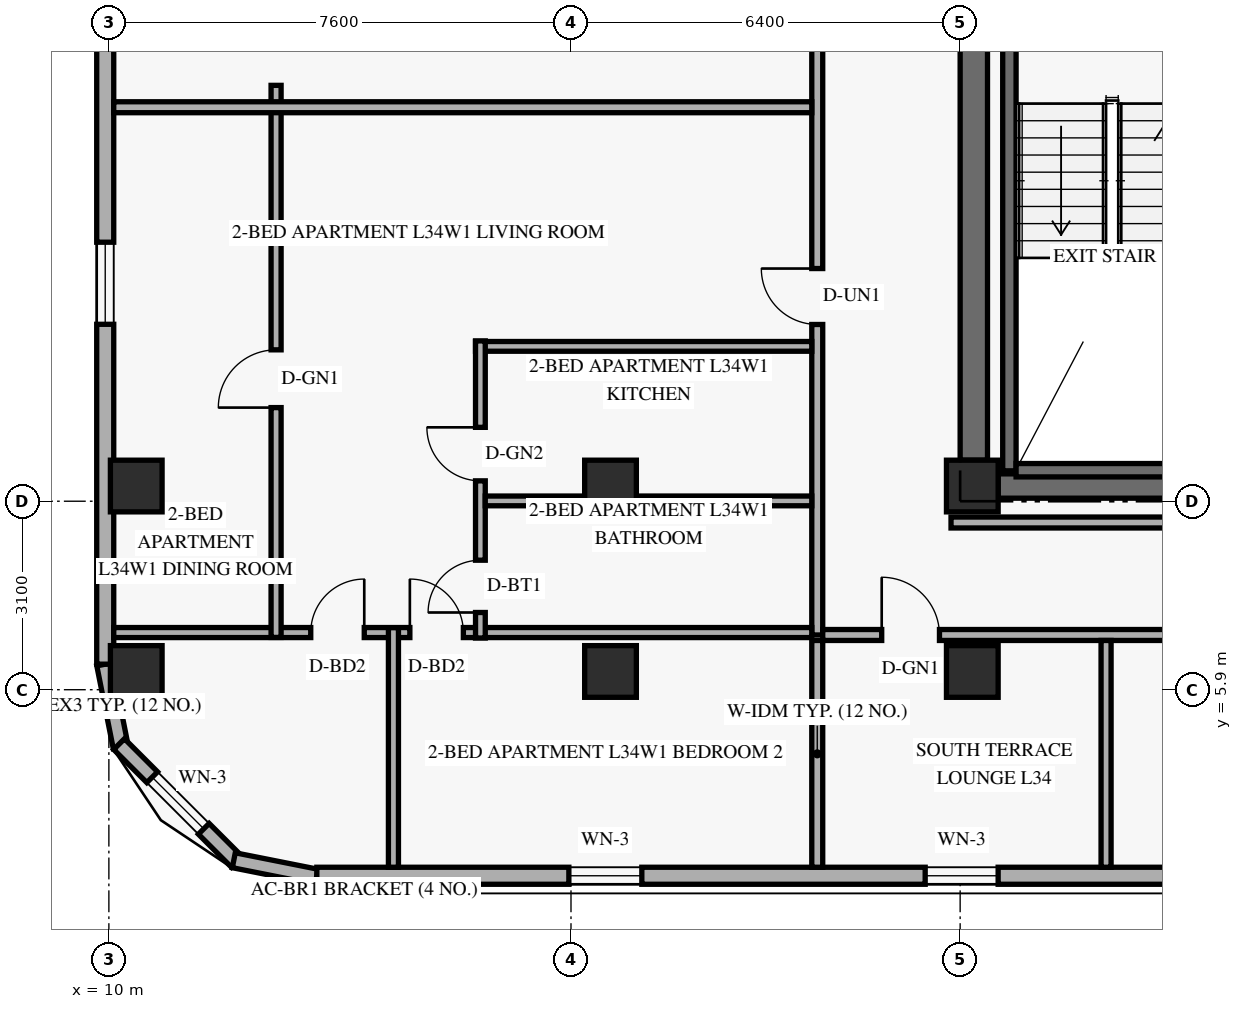
"""IFC4 building model, lengths in metres.
Left out: names, types, materials, properties, quantities, classifications, styles, units other than length and angle.
Written with IfcOpenShell. Run it as: python <this file> out.ifc"""

import sys

from ifc_helpers import new_model, si_unit, direction, frame, frame_2d, origin, origin_2d, place, context, subcontext, project, spatial, rectangle, extrude, element, fill, save


model = new_model("IFC4")
c1 = context("Model", 3, precision=1e-05, world=origin(), true_north=direction((0.0, 1.0)))
c2 = subcontext(c1, "Body", "Model", "MODEL_VIEW")
j1 = project(units=[si_unit("LENGTHUNIT", "METRE"), si_unit("PLANEANGLEUNIT", "RADIAN")], contexts=[c1])
p1 = place(None, origin())
s1 = spatial("IfcSite", under=j1, at=p1, CompositionType="ELEMENT")
p2 = place(p1, origin())
s2 = spatial("IfcBuilding", under=s1, at=p2, CompositionType="ELEMENT")
p3 = place(p2, frame((0.0, 0.0, 132.0)))
s3 = spatial("IfcBuildingStorey", under=s2, at=p3, CompositionType="ELEMENT", Elevation=132.0)
p4 = place(p3, frame((24.225, 9.675, 0.0), z_axis=(0.0, 0.0, 1.0), x_axis=(0.0, 1.0, 0.0)))
e1 = element("IfcWall", 1, at=p4, inside=s3, PredefinedType="SHEAR", context=c2, shape_type="SweptSolid", body=[
    extrude(rectangle(XDim=7.45, YDim=0.45, at=frame_2d((3.725, 0.0))), origin(), (0.0, 0.0, 1.0), 2.689),
])
p5 = place(p3, frame((24.625, 9.25, 0.0), z_axis=(0.0, 0.0, 1.0), x_axis=(1.0, 0.0, 0.0)))
e2 = element("IfcWall", 2, at=p5, inside=s3, PredefinedType="SHEAR", context=c2, shape_type="SweptSolid", body=[
    extrude(rectangle(XDim=10.15, YDim=0.4, at=frame_2d((5.075, 0.0))), origin(), (0.0, 0.0, 1.0), 3.3),
])
p6 = place(p5, frame((5.2, 0.0, 0.0)))
e3 = element("IfcOpeningElement", 3, at=p6, cuts=e2, PredefinedType="OPENING", context=c2, shape_type="SweptSolid", body=[
    extrude(rectangle(XDim=1.05, YDim=2.15, at=frame_2d((0.525, 1.075))), frame((0.0, 0.21, 0.0), z_axis=(0.0, -1.0, 0.0), x_axis=(1.0, 0.0, 0.0)), (0.0, 0.0, 1.0), 0.42),
])
p7 = place(p3, frame((24.81, 9.5, 0.0), z_axis=(0.0, 0.0, 1.0), x_axis=(0.0, 1.0, 0.0)))
e4 = element("IfcWall", 4, at=p7, inside=s3, PredefinedType="SHEAR", context=c2, shape_type="SweptSolid", body=[
    extrude(rectangle(XDim=7.76, YDim=0.22, at=frame_2d((3.88, 0.0))), origin(), (0.0, 0.0, 1.0), 3.3),
])
p8 = place(p3, frame((24.92, 9.51, 0.0), z_axis=(0.0, 0.0, 1.0), x_axis=(1.0, 0.0, 0.0)))
e5 = element("IfcWall", 5, at=p8, inside=s3, PredefinedType="SHEAR", context=c2, shape_type="SweptSolid", body=[
    extrude(rectangle(XDim=3.16, YDim=0.22, at=frame_2d((1.58, 0.0))), origin(), (0.0, 0.0, 1.0), 3.3),
])
for number, where, z_axis, x_axis in (
    (6, (10.45, 6.2, 0.0), (0.0, 0.0, 1.0), (1.0, 0.0, 0.0)),
    (7, (10.45, 9.25, 0.0), (0.0, 0.0, 1.0), (1.0, 0.0, 0.0)),
    (8, (18.25, 6.2, 0.0), (0.0, 0.0, 1.0), (1.0, 0.0, 0.0)),
    (9, (18.25, 9.25, 0.0), (0.0, 0.0, 1.0), (1.0, 0.0, 0.0)),
    (10, (24.2, 6.2, 0.0), (0.0, 0.0, 1.0), (1.0, 0.0, 0.0)),
    (11, (24.2, 9.25, 0.0), (0.0, 0.0, 1.0), (1.0, 0.0, 0.0)),
):
    element("IfcColumn", number, at=place(p3, frame(where, z_axis=z_axis, x_axis=x_axis)), inside=s3, PredefinedType="COLUMN", context=c2, shape_type="SweptSolid", body=[
        extrude(rectangle(XDim=0.85, YDim=0.85, at=origin_2d()), origin(), (0.0, 0.0, 1.0), 3.6),
    ])
p9 = place(p3, frame((9.924, 6.316, 0.0), z_axis=(0.0, 0.0, 1.0), x_axis=(0.195000137217, -0.980803214965, 0.0)))
e12 = element("IfcWall", 12, at=p9, inside=s3, PredefinedType="SOLIDWALL", context=c2, shape_type="SweptSolid", body=[
    extrude(rectangle(XDim=1.388, YDim=0.25, at=frame_2d((0.694, 0.0))), origin(), (0.0, 0.0, 1.0), 3.3),
])
p10 = place(p3, frame((10.168, 5.005, 0.0), z_axis=(0.0, 0.0, 1.0), x_axis=(0.707151344399, -0.707062215165, 0.0)))
e13 = element("IfcWall", 13, at=p10, inside=s3, PredefinedType="SOLIDWALL", context=c2, shape_type="SweptSolid", body=[
    extrude(rectangle(XDim=2.739, YDim=0.25, at=frame_2d((1.37, 0.0))), origin(), (0.0, 0.0, 1.0), 3.3),
])
p11 = place(p10, frame((0.77, 0.0, 0.85)))
e14 = element("IfcOpeningElement", 14, at=p11, cuts=e13, PredefinedType="OPENING", context=c2, shape_type="SweptSolid", body=[
    extrude(rectangle(XDim=1.2, YDim=1.5, at=frame_2d((0.6, 0.75))), frame((0.0, 0.135, 0.0), z_axis=(0.0, -1.0, 0.0), x_axis=(1.0, 0.0, 0.0)), (0.0, 0.0, 1.0), 0.27),
])
p12 = place(p3, frame((12.054, 3.095, 0.0), z_axis=(0.0, 0.0, 1.0), x_axis=(0.980809899341, -0.19496651342, 0.0)))
e15 = element("IfcWall", 15, at=p12, inside=s3, PredefinedType="SOLIDWALL", context=c2, shape_type="SweptSolid", body=[
    extrude(rectangle(XDim=1.389, YDim=0.25, at=frame_2d((0.694, 0.0))), origin(), (0.0, 0.0, 1.0), 3.3),
])
p13 = place(p3, frame((13.42, 2.84, 0.0), z_axis=(0.0, 0.0, 1.0), x_axis=(1.0, 0.0, 0.0)))
e16 = element("IfcWall", 16, at=p13, inside=s3, PredefinedType="SOLIDWALL", context=c2, shape_type="SweptSolid", body=[
    extrude(rectangle(XDim=36.56, YDim=0.28, at=frame_2d((18.28, 0.0))), origin(), (0.0, 0.0, 1.0), 3.3),
])
p14 = place(p13, frame((4.145, 0.0, 0.85)))
e17 = element("IfcOpeningElement", 17, at=p14, cuts=e16, PredefinedType="OPENING", context=c2, shape_type="SweptSolid", body=[
    extrude(rectangle(XDim=1.2, YDim=1.5, at=frame_2d((0.6, 0.75))), frame((0.0, 0.15, 0.0), z_axis=(0.0, -1.0, 0.0), x_axis=(1.0, 0.0, 0.0)), (0.0, 0.0, 1.0), 0.3),
])
p15 = place(p13, frame((10.005, 0.0, 0.85)))
e18 = element("IfcOpeningElement", 18, at=p15, cuts=e16, PredefinedType="OPENING", context=c2, shape_type="SweptSolid", body=[
    extrude(rectangle(XDim=1.2, YDim=1.5, at=frame_2d((0.6, 0.75))), frame((0.0, 0.15, 0.0), z_axis=(0.0, -1.0, 0.0), x_axis=(1.0, 0.0, 0.0)), (0.0, 0.0, 1.0), 0.3),
])
p16 = place(p13, frame((16.89, 0.0, 0.85)))
e19 = element("IfcOpeningElement", 19, at=p16, cuts=e16, PredefinedType="OPENING", context=c2, shape_type="SweptSolid", body=[
    extrude(rectangle(XDim=1.2, YDim=1.5, at=frame_2d((0.6, 0.75))), frame((0.0, 0.15, 0.0), z_axis=(0.0, -1.0, 0.0), x_axis=(1.0, 0.0, 0.0)), (0.0, 0.0, 1.0), 0.3),
])
p17 = place(p13, frame((22.465, 0.0, 0.85)))
e20 = element("IfcOpeningElement", 20, at=p17, cuts=e16, PredefinedType="OPENING", context=c2, shape_type="SweptSolid", body=[
    extrude(rectangle(XDim=1.2, YDim=1.5, at=frame_2d((0.6, 0.75))), frame((0.0, 0.15, 0.0), z_axis=(0.0, -1.0, 0.0), x_axis=(1.0, 0.0, 0.0)), (0.0, 0.0, 1.0), 0.3),
])
p18 = place(p13, frame((26.625, 0.0, 0.85)))
e21 = element("IfcOpeningElement", 21, at=p18, cuts=e16, PredefinedType="OPENING", context=c2, shape_type="SweptSolid", body=[
    extrude(rectangle(XDim=1.2, YDim=1.5, at=frame_2d((0.6, 0.75))), frame((0.0, 0.15, 0.0), z_axis=(0.0, -1.0, 0.0), x_axis=(1.0, 0.0, 0.0)), (0.0, 0.0, 1.0), 0.3),
])
p19 = place(p13, frame((31.45, 0.0, 0.85)))
e22 = element("IfcOpeningElement", 22, at=p19, cuts=e16, PredefinedType="OPENING", context=c2, shape_type="SweptSolid", body=[
    extrude(rectangle(XDim=1.2, YDim=1.5, at=frame_2d((0.6, 0.75))), frame((0.0, 0.15, 0.0), z_axis=(0.0, -1.0, 0.0), x_axis=(1.0, 0.0, 0.0)), (0.0, 0.0, 1.0), 0.3),
])
p20 = place(p13, frame((34.57, 0.0, 0.85)))
e23 = element("IfcOpeningElement", 23, at=p20, cuts=e16, PredefinedType="OPENING", context=c2, shape_type="SweptSolid", body=[
    extrude(rectangle(XDim=1.2, YDim=1.5, at=frame_2d((0.6, 0.75))), frame((0.0, 0.15, 0.0), z_axis=(0.0, -1.0, 0.0), x_axis=(1.0, 0.0, 0.0)), (0.0, 0.0, 1.0), 0.3),
])
p21 = place(p3, frame((9.94, 41.68, 0.0), z_axis=(0.0, 0.0, 1.0), x_axis=(0.0, -1.0, 0.0)))
e24 = element("IfcWall", 24, at=p21, inside=s3, PredefinedType="SOLIDWALL", context=c2, shape_type="SweptSolid", body=[
    extrude(rectangle(XDim=35.36, YDim=0.28, at=frame_2d((17.68, 0.0))), origin(), (0.0, 0.0, 1.0), 3.3),
])
p22 = place(p21, frame((28.42, 0.0, 0.85)))
e25 = element("IfcOpeningElement", 25, at=p22, cuts=e24, PredefinedType="OPENING", context=c2, shape_type="SweptSolid", body=[
    extrude(rectangle(XDim=1.35, YDim=1.55, at=frame_2d((0.675, 0.775))), frame((0.0, 0.15, 0.0), z_axis=(0.0, -1.0, 0.0), x_axis=(1.0, 0.0, 0.0)), (0.0, 0.0, 1.0), 0.3),
])
p23 = place(p21, frame((22.037, 0.0, 0.85)))
e26 = element("IfcOpeningElement", 26, at=p23, cuts=e24, PredefinedType="OPENING", context=c2, shape_type="SweptSolid", body=[
    extrude(rectangle(XDim=1.35, YDim=1.55, at=frame_2d((0.675, 0.775))), frame((0.0, 0.15, 0.0), z_axis=(0.0, -1.0, 0.0), x_axis=(1.0, 0.0, 0.0)), (0.0, 0.0, 1.0), 0.3),
])
p24 = place(p21, frame((17.619, 0.0, 0.85)))
e27 = element("IfcOpeningElement", 27, at=p24, cuts=e24, PredefinedType="OPENING", context=c2, shape_type="SweptSolid", body=[
    extrude(rectangle(XDim=1.35, YDim=1.55, at=frame_2d((0.675, 0.775))), frame((0.0, 0.15, 0.0), z_axis=(0.0, -1.0, 0.0), x_axis=(1.0, 0.0, 0.0)), (0.0, 0.0, 1.0), 0.3),
])
p25 = place(p21, frame((12.712, 0.0, 0.85)))
e28 = element("IfcOpeningElement", 28, at=p25, cuts=e24, PredefinedType="OPENING", context=c2, shape_type="SweptSolid", body=[
    extrude(rectangle(XDim=1.35, YDim=1.55, at=frame_2d((0.675, 0.775))), frame((0.0, 0.15, 0.0), z_axis=(0.0, -1.0, 0.0), x_axis=(1.0, 0.0, 0.0)), (0.0, 0.0, 1.0), 0.3),
])
p26 = place(p21, frame((8.848, 0.0, 0.85)))
e29 = element("IfcOpeningElement", 29, at=p26, cuts=e24, PredefinedType="OPENING", context=c2, shape_type="SweptSolid", body=[
    extrude(rectangle(XDim=1.35, YDim=1.55, at=frame_2d((0.675, 0.775))), frame((0.0, 0.15, 0.0), z_axis=(0.0, -1.0, 0.0), x_axis=(1.0, 0.0, 0.0)), (0.0, 0.0, 1.0), 0.3),
])
p27 = place(p21, frame((5.101, 0.0, 0.85)))
e30 = element("IfcOpeningElement", 30, at=p27, cuts=e24, PredefinedType="OPENING", context=c2, shape_type="SweptSolid", body=[
    extrude(rectangle(XDim=1.35, YDim=1.55, at=frame_2d((0.675, 0.775))), frame((0.0, 0.15, 0.0), z_axis=(0.0, -1.0, 0.0), x_axis=(1.0, 0.0, 0.0)), (0.0, 0.0, 1.0), 0.3),
])
p28 = place(p3, frame((21.65, 6.8, 0.0), z_axis=(0.0, 0.0, 1.0), x_axis=(0.0, 1.0, 0.0)))
e31 = element("IfcWall", 31, at=p28, inside=s3, PredefinedType="STANDARD", context=c2, shape_type="SweptSolid", body=[
    extrude(rectangle(XDim=34.4, YDim=0.18, at=frame_2d((17.2, 0.0))), origin(), (0.0, 0.0, 1.0), 2.671),
])
p29 = place(p28, frame((5.107, 0.0, 0.0)))
e32 = element("IfcOpeningElement", 32, at=p29, cuts=e31, PredefinedType="OPENING", context=c2, shape_type="SweptSolid", body=[
    extrude(rectangle(XDim=0.92, YDim=2.15, at=frame_2d((0.46, 1.075))), frame((0.0, 0.1, 0.0), z_axis=(0.0, -1.0, 0.0), x_axis=(1.0, 0.0, 0.0)), (0.0, 0.0, 1.0), 0.2),
])
p30 = place(p28, frame((13.99, 0.0, 0.0)))
e33 = element("IfcOpeningElement", 33, at=p30, cuts=e31, PredefinedType="OPENING", context=c2, shape_type="SweptSolid", body=[
    extrude(rectangle(XDim=0.92, YDim=2.15, at=frame_2d((0.46, 1.075))), frame((0.0, 0.1, 0.0), z_axis=(0.0, -1.0, 0.0), x_axis=(1.0, 0.0, 0.0)), (0.0, 0.0, 1.0), 0.2),
])
p31 = place(p28, frame((28.646, 0.0, 0.0)))
e34 = element("IfcOpeningElement", 34, at=p31, cuts=e31, PredefinedType="OPENING", context=c2, shape_type="SweptSolid", body=[
    extrude(rectangle(XDim=0.92, YDim=2.15, at=frame_2d((0.46, 1.075))), frame((0.0, 0.1, 0.0), z_axis=(0.0, -1.0, 0.0), x_axis=(1.0, 0.0, 0.0)), (0.0, 0.0, 1.0), 0.2),
])
p32 = place(p3, frame((21.74, 6.8, 0.0), z_axis=(0.0, 0.0, 1.0), x_axis=(1.0, 0.0, 0.0)))
e35 = element("IfcWall", 35, at=p32, inside=s3, PredefinedType="STANDARD", context=c2, shape_type="SweptSolid", body=[
    extrude(rectangle(XDim=13.68, YDim=0.18, at=frame_2d((6.84, 0.0))), origin(), (0.0, 0.0, 1.0), 2.671),
])
p33 = place(p32, frame((0.97, 0.0, 0.0)))
e36 = element("IfcOpeningElement", 36, at=p33, cuts=e35, PredefinedType="OPENING", context=c2, shape_type="SweptSolid", body=[
    extrude(rectangle(XDim=0.95, YDim=2.15, at=frame_2d((0.475, 1.075))), frame((0.0, 0.1, 0.0), z_axis=(0.0, -1.0, 0.0), x_axis=(1.0, 0.0, 0.0)), (0.0, 0.0, 1.0), 0.2),
])
p34 = place(p32, frame((9.11, 0.0, 0.0)))
e37 = element("IfcOpeningElement", 37, at=p34, cuts=e35, PredefinedType="OPENING", context=c2, shape_type="SweptSolid", body=[
    extrude(rectangle(XDim=0.95, YDim=2.15, at=frame_2d((0.475, 1.075))), frame((0.0, 0.1, 0.0), z_axis=(0.0, -1.0, 0.0), x_axis=(1.0, 0.0, 0.0)), (0.0, 0.0, 1.0), 0.2),
])
p35 = place(p3, frame((23.85, 8.65, 0.0), z_axis=(0.0, 0.0, 1.0), x_axis=(1.0, 0.0, 0.0)))
e38 = element("IfcWall", 38, at=p35, inside=s3, PredefinedType="STANDARD", context=c2, shape_type="SweptSolid", body=[
    extrude(rectangle(XDim=11.57, YDim=0.18, at=frame_2d((5.785, 0.0))), origin(), (0.0, 0.0, 1.0), 2.671),
])
p36 = place(p3, frame((21.65, 2.98, 0.0), z_axis=(0.0, 0.0, 1.0), x_axis=(0.0, 1.0, 0.0)))
e39 = element("IfcWall", 39, at=p36, inside=s3, PredefinedType="PARTITIONING", context=c2, shape_type="SweptSolid", body=[
    extrude(rectangle(XDim=3.73, YDim=0.18, at=frame_2d((1.865, 0.0))), origin(), (0.0, 0.0, 1.0), 2.749),
])
p37 = place(p3, frame((10.08, 6.84, 0.0), z_axis=(0.0, 0.0, 1.0), x_axis=(1.0, 0.0, 0.0)))
e40 = element("IfcWall", 40, at=p37, inside=s3, PredefinedType="PARTITIONING", context=c2, shape_type="SweptSolid", body=[
    extrude(rectangle(XDim=11.48, YDim=0.165, at=frame_2d((5.74, 0.0))), origin(), (0.0, 0.0, 1.0), 2.671),
])
p38 = place(p37, frame((3.24, 0.0, 0.0)))
e41 = element("IfcOpeningElement", 41, at=p38, cuts=e40, PredefinedType="OPENING", context=c2, shape_type="SweptSolid", body=[
    extrude(rectangle(XDim=0.88, YDim=2.14, at=frame_2d((0.44, 1.07))), frame((0.0, 0.093, 0.0), z_axis=(0.0, -1.0, 0.0), x_axis=(1.0, 0.0, 0.0)), (0.0, 0.0, 1.0), 0.185),
])
p39 = place(p37, frame((4.87, 0.0, 0.0)))
e42 = element("IfcOpeningElement", 42, at=p39, cuts=e40, PredefinedType="OPENING", context=c2, shape_type="SweptSolid", body=[
    extrude(rectangle(XDim=0.88, YDim=2.14, at=frame_2d((0.44, 1.07))), frame((0.0, 0.093, 0.0), z_axis=(0.0, -1.0, 0.0), x_axis=(1.0, 0.0, 0.0)), (0.0, 0.0, 1.0), 0.185),
])
p40 = place(p3, frame((16.03, 11.547, 0.0), z_axis=(0.0, 0.0, 1.0), x_axis=(1.0, 0.0, 0.0)))
e43 = element("IfcWall", 43, at=p40, inside=s3, PredefinedType="PLUMBINGWALL", context=c2, shape_type="SweptSolid", body=[
    extrude(rectangle(XDim=5.53, YDim=0.16, at=frame_2d((2.765, 0.0))), origin(), (0.0, 0.0, 1.0), 2.671),
])
p41 = place(p3, frame((16.11, 6.75, 0.0), z_axis=(0.0, 0.0, 1.0), x_axis=(0.0, 1.0, 0.0)))
e44 = element("IfcWall", 44, at=p41, inside=s3, PredefinedType="PLUMBINGWALL", context=c2, shape_type="SweptSolid", body=[
    extrude(rectangle(XDim=4.887, YDim=0.16, at=frame_2d((2.443, 0.0))), origin(), (0.0, 0.0, 1.0), 2.671),
])
p42 = place(p41, frame((0.42, 0.0, 0.0)))
e45 = element("IfcOpeningElement", 45, at=p42, cuts=e44, PredefinedType="OPENING", context=c2, shape_type="SweptSolid", body=[
    extrude(rectangle(XDim=0.86, YDim=2.12, at=frame_2d((0.43, 1.06))), frame((0.0, 0.09, 0.0), z_axis=(0.0, -1.0, 0.0), x_axis=(1.0, 0.0, 0.0)), (0.0, 0.0, 1.0), 0.18),
])
p43 = place(p41, frame((2.585, 0.0, 0.0)))
e46 = element("IfcOpeningElement", 46, at=p43, cuts=e44, PredefinedType="OPENING", context=c2, shape_type="SweptSolid", body=[
    extrude(rectangle(XDim=0.88, YDim=2.12, at=frame_2d((0.44, 1.06))), frame((0.0, 0.09, 0.0), z_axis=(0.0, -1.0, 0.0), x_axis=(1.0, 0.0, 0.0)), (0.0, 0.0, 1.0), 0.18),
])
p44 = place(p3, frame((16.19, 9.005, 0.0), z_axis=(0.0, 0.0, 1.0), x_axis=(1.0, 0.0, 0.0)))
e47 = element("IfcWall", 47, at=p44, inside=s3, PredefinedType="PLUMBINGWALL", context=c2, shape_type="SweptSolid", body=[
    extrude(rectangle(XDim=5.37, YDim=0.16, at=frame_2d((2.685, 0.0))), origin(), (0.0, 0.0, 1.0), 2.671),
])
p45 = place(p3, frame((12.75, 6.76, 0.0), z_axis=(0.0, 0.0, 1.0), x_axis=(0.0, 1.0, 0.0)))
e48 = element("IfcWall", 48, at=p45, inside=s3, PredefinedType="PARTITIONING", context=c2, shape_type="SweptSolid", body=[
    extrude(rectangle(XDim=9.08, YDim=0.165, at=frame_2d((4.54, 0.0))), origin(), (0.0, 0.0, 1.0), 2.671),
])
p46 = place(p45, frame((3.78, 0.0, 0.0)))
e49 = element("IfcOpeningElement", 49, at=p46, cuts=e48, PredefinedType="OPENING", context=c2, shape_type="SweptSolid", body=[
    extrude(rectangle(XDim=0.95, YDim=2.15, at=frame_2d((0.475, 1.075))), frame((0.0, 0.093, 0.0), z_axis=(0.0, -1.0, 0.0), x_axis=(1.0, 0.0, 0.0)), (0.0, 0.0, 1.0), 0.185),
])
p47 = place(p3, frame((14.68, 2.98, 0.0), z_axis=(0.0, 0.0, 1.0), x_axis=(0.0, 1.0, 0.0)))
e50 = element("IfcWall", 50, at=p47, inside=s3, PredefinedType="PARTITIONING", context=c2, shape_type="SweptSolid", body=[
    extrude(rectangle(XDim=3.94, YDim=0.165, at=frame_2d((1.97, 0.0))), origin(), (0.0, 0.0, 1.0), 2.749),
])
p48 = place(p3, frame((10.08, 15.48, 0.0), z_axis=(0.0, 0.0, 1.0), x_axis=(1.0, 0.0, 0.0)))
e51 = element("IfcWall", 51, at=p48, inside=s3, PredefinedType="PARTITIONING", context=c2, shape_type="SweptSolid", body=[
    extrude(rectangle(XDim=11.48, YDim=0.18, at=frame_2d((5.74, 0.0))), origin(), (0.0, 0.0, 1.0), 2.671),
])
p49 = place(p3, frame((26.4, 2.98, 0.0), z_axis=(0.0, 0.0, 1.0), x_axis=(0.0, 1.0, 0.0)))
e52 = element("IfcWall", 52, at=p49, inside=s3, PredefinedType="PARTITIONING", context=c2, shape_type="SweptSolid", body=[
    extrude(rectangle(XDim=3.73, YDim=0.165, at=frame_2d((1.865, 0.0))), origin(), (0.0, 0.0, 1.0), 2.749),
])
p50 = place(p11, origin())
e53 = element("IfcWindow", 53, at=p50, inside=s3, PartitioningType="SINGLE_PANEL", PredefinedType="WINDOW", context=c2, shape_type="SweptSolid", body=[
    extrude(rectangle(XDim=1.2, YDim=1.5, at=frame_2d((0.6, 0.75))), frame((0.0, 0.03, 0.0), z_axis=(0.0, -1.0, 0.0), x_axis=(1.0, 0.0, 0.0)), (0.0, 0.0, 1.0), 0.06),
])
fill(e14, e53)
p51 = place(p14, origin())
e54 = element("IfcWindow", 54, at=p51, inside=s3, PartitioningType="SINGLE_PANEL", PredefinedType="WINDOW", context=c2, shape_type="SweptSolid", body=[
    extrude(rectangle(XDim=1.2, YDim=1.5, at=frame_2d((0.6, 0.75))), frame((0.0, 0.03, 0.0), z_axis=(0.0, -1.0, 0.0), x_axis=(1.0, 0.0, 0.0)), (0.0, 0.0, 1.0), 0.06),
])
fill(e17, e54)
p52 = place(p15, origin())
e55 = element("IfcWindow", 55, at=p52, inside=s3, PartitioningType="SINGLE_PANEL", PredefinedType="WINDOW", context=c2, shape_type="SweptSolid", body=[
    extrude(rectangle(XDim=1.2, YDim=1.5, at=frame_2d((0.6, 0.75))), frame((0.0, 0.03, 0.0), z_axis=(0.0, -1.0, 0.0), x_axis=(1.0, 0.0, 0.0)), (0.0, 0.0, 1.0), 0.06),
])
fill(e18, e55)
p53 = place(p22, origin())
e56 = element("IfcWindow", 56, at=p53, inside=s3, PartitioningType="SINGLE_PANEL", PredefinedType="WINDOW", context=c2, shape_type="SweptSolid", body=[
    extrude(rectangle(XDim=1.35, YDim=1.55, at=frame_2d((0.675, 0.775))), frame((0.0, 0.03, 0.0), z_axis=(0.0, -1.0, 0.0), x_axis=(1.0, 0.0, 0.0)), (0.0, 0.0, 1.0), 0.06),
])
fill(e25, e56)
p54 = place(p46, origin())
e57 = element("IfcDoor", 57, at=p54, inside=s3, OperationType="SINGLE_SWING_LEFT", PredefinedType="DOOR", context=c2, shape_type="SweptSolid", body=[
    extrude(rectangle(XDim=0.95, YDim=2.15, at=frame_2d((0.475, 1.075))), frame((0.0, 0.025, 0.0), z_axis=(0.0, -1.0, 0.0), x_axis=(1.0, 0.0, 0.0)), (0.0, 0.0, 1.0), 0.05),
])
fill(e49, e57)
p55 = place(p29, origin())
e58 = element("IfcDoor", 58, at=p55, inside=s3, OperationType="SINGLE_SWING_RIGHT", PredefinedType="DOOR", context=c2, shape_type="SweptSolid", body=[
    extrude(rectangle(XDim=0.92, YDim=2.15, at=frame_2d((0.46, 1.075))), frame((0.0, 0.025, 0.0), z_axis=(0.0, -1.0, 0.0), x_axis=(1.0, 0.0, 0.0)), (0.0, 0.0, 1.0), 0.05),
])
fill(e32, e58)
p56 = place(p42, origin())
e59 = element("IfcDoor", 59, at=p56, inside=s3, OperationType="SINGLE_SWING_LEFT", PredefinedType="DOOR", context=c2, shape_type="SweptSolid", body=[
    extrude(rectangle(XDim=0.86, YDim=2.12, at=frame_2d((0.43, 1.06))), frame((0.0, 0.025, 0.0), z_axis=(0.0, -1.0, 0.0), x_axis=(1.0, 0.0, 0.0)), (0.0, 0.0, 1.0), 0.05),
])
fill(e45, e59)
p57 = place(p43, origin())
e60 = element("IfcDoor", 60, at=p57, inside=s3, OperationType="SINGLE_SWING_RIGHT", PredefinedType="DOOR", context=c2, shape_type="SweptSolid", body=[
    extrude(rectangle(XDim=0.88, YDim=2.12, at=frame_2d((0.44, 1.06))), frame((0.0, 0.025, 0.0), z_axis=(0.0, -1.0, 0.0), x_axis=(1.0, 0.0, 0.0)), (0.0, 0.0, 1.0), 0.05),
])
fill(e46, e60)
p58 = place(p38, origin())
e61 = element("IfcDoor", 61, at=p58, inside=s3, OperationType="SINGLE_SWING_RIGHT", PredefinedType="DOOR", context=c2, shape_type="SweptSolid", body=[
    extrude(rectangle(XDim=0.88, YDim=2.14, at=frame_2d((0.44, 1.07))), frame((0.0, 0.025, 0.0), z_axis=(0.0, -1.0, 0.0), x_axis=(1.0, 0.0, 0.0)), (0.0, 0.0, 1.0), 0.05),
])
fill(e41, e61)
p59 = place(p39, origin())
e62 = element("IfcDoor", 62, at=p59, inside=s3, OperationType="SINGLE_SWING_LEFT", PredefinedType="DOOR", context=c2, shape_type="SweptSolid", body=[
    extrude(rectangle(XDim=0.88, YDim=2.14, at=frame_2d((0.44, 1.07))), frame((0.0, 0.025, 0.0), z_axis=(0.0, -1.0, 0.0), x_axis=(1.0, 0.0, 0.0)), (0.0, 0.0, 1.0), 0.05),
])
fill(e42, e62)
p60 = place(p33, origin())
e63 = element("IfcDoor", 63, at=p60, inside=s3, OperationType="SINGLE_SWING_LEFT", PredefinedType="DOOR", context=c2, shape_type="SweptSolid", body=[
    extrude(rectangle(XDim=0.95, YDim=2.15, at=frame_2d((0.475, 1.075))), frame((0.0, 0.025, 0.0), z_axis=(0.0, -1.0, 0.0), x_axis=(1.0, 0.0, 0.0)), (0.0, 0.0, 1.0), 0.05),
])
fill(e36, e63)
save(model, sys.argv[1])
